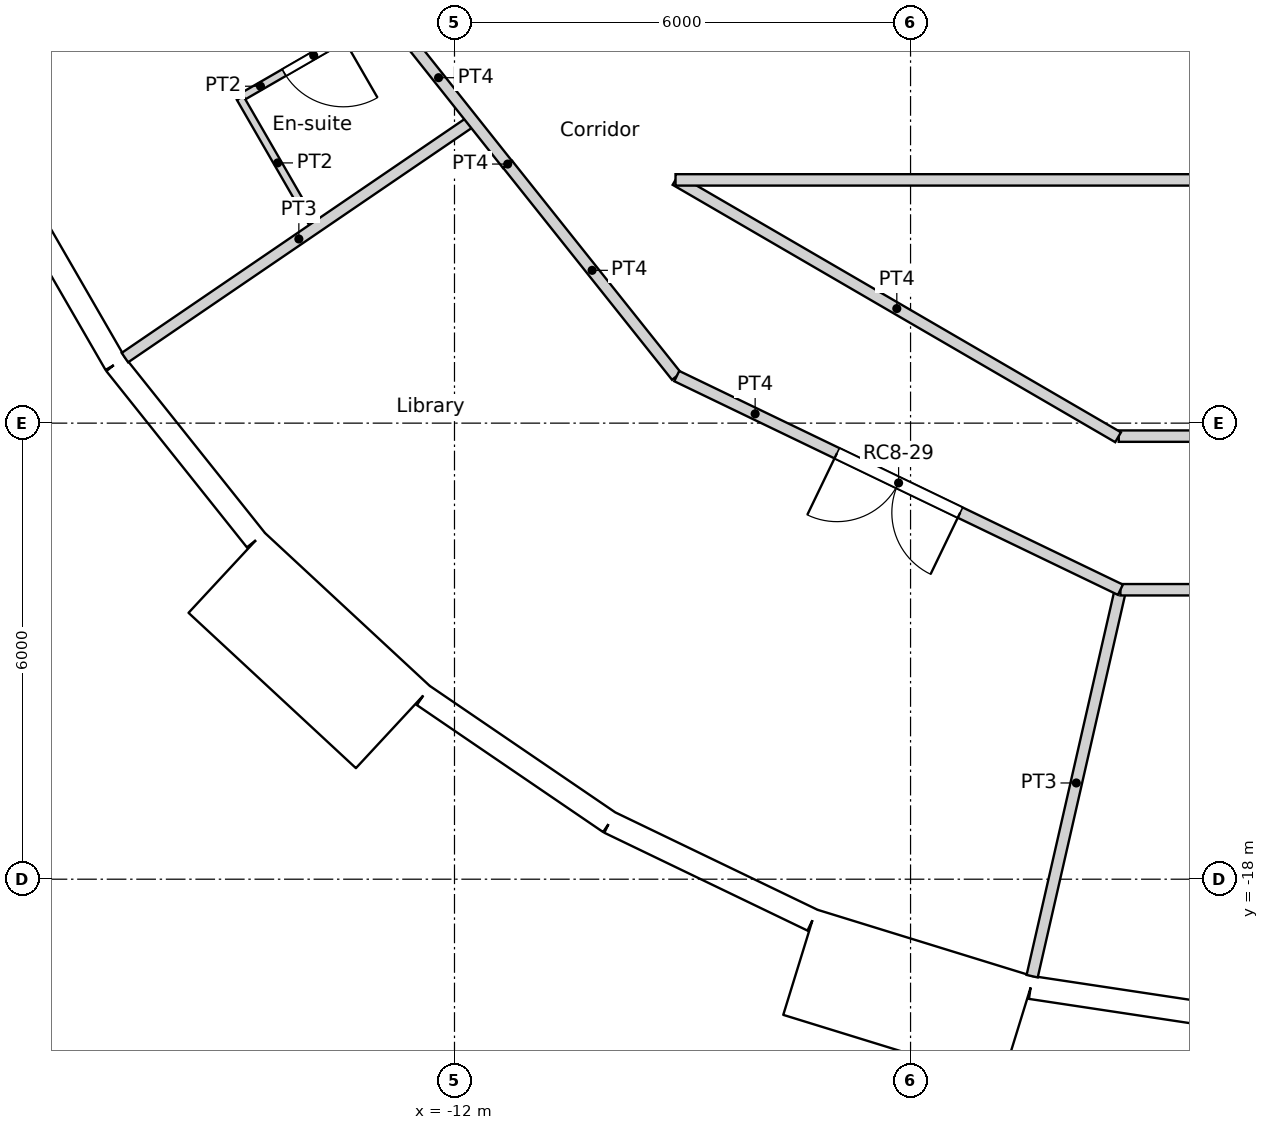
"""IFC4 building model, lengths in metres.
Left out: names, types, materials, properties, quantities, classifications, styles, units other than length and angle.
Written with IfcOpenShell. Run it as: python <this file> out.ifc"""

import sys

from ifc_helpers import new_model, si_unit, direction, frame, frame_2d, origin, origin_2d, place, context, subcontext, project, spatial, rectangle, circle, extrude, element, fill, save


model = new_model("IFC4")
c1 = context("Model", 3, precision=1e-05, world=origin(), true_north=direction((0.0, 1.0)))
c2 = subcontext(c1, "Body", "Model", "MODEL_VIEW")
j1 = project(units=[si_unit("LENGTHUNIT", "METRE"), si_unit("PLANEANGLEUNIT", "RADIAN")], contexts=[c1])
p1 = place(None, origin())
s1 = spatial("IfcSite", under=j1, at=p1, CompositionType="ELEMENT")
p2 = place(p1, origin())
s2 = spatial("IfcBuilding", under=s1, at=p2, CompositionType="ELEMENT")
p3 = place(p2, frame((0.0, 0.0, 305.4)))
s3 = spatial("IfcBuildingStorey", under=s2, at=p3, CompositionType="ELEMENT", Elevation=305.4)
for number, where, z_axis, x_axis in (
    (1, (-16.958, -8.167, 0.0), (0.0, 0.0, 1.0), (1.0, 0.0, 0.0)),
    (2, (-13.798, -12.802, 0.0), (0.0, 0.0, 1.0), (1.0, 0.0, 0.0)),
    (3, (-9.411, -16.301, 0.0), (0.0, 0.0, 1.0), (1.0, 0.0, 0.0)),
    (4, (-4.188, -18.35, 0.0), (0.0, 0.0, 1.0), (1.0, 0.0, 0.0)),
):
    element("IfcColumn", number, at=place(p3, frame(where, z_axis=z_axis, x_axis=x_axis)), inside=s3, PredefinedType="COLUMN", context=c2, shape_type="SweptSolid", body=[
        extrude(circle(Radius=0.45, at=origin_2d()), origin(), (0.0, 0.0, 1.0), 3.6),
    ])
p4 = place(p3, frame((-17.941, -8.657, 0.0), z_axis=(0.0, 0.0, 1.0), x_axis=(0.499950756475, -0.86605383268, 0.0)))
e5 = element("IfcWall", 5, at=p4, inside=s3, PredefinedType="SOLIDWALL", context=c2, shape_type="SweptSolid", body=[
    extrude(rectangle(XDim=2.962, YDim=0.3, at=frame_2d((1.481, 0.0))), origin(), (0.0, 0.0, 1.0), 2.8),
])
p5 = place(p4, frame((1.481, 0.0, 1.55)))
e6 = element("IfcOpeningElement", 6, at=p5, cuts=e5, PredefinedType="OPENING", context=c2, shape_type="SweptSolid", body=[
    extrude(circle(Radius=0.9, at=origin_2d()), frame((0.0, 0.16, 0.0), z_axis=(0.0, -1.0, 0.0), x_axis=(1.0, 0.0, 0.0)), (0.0, 0.0, 1.0), 0.32),
])
p6 = place(p3, frame((-16.46, -11.222, 0.0), z_axis=(0.0, 0.0, 1.0), x_axis=(0.623498236992, -0.781824755599, 0.0)))
e7 = element("IfcWall", 7, at=p6, inside=s3, PredefinedType="SOLIDWALL", context=c2, shape_type="SweptSolid", body=[
    extrude(rectangle(XDim=2.962, YDim=0.3, at=frame_2d((1.481, 0.0))), origin(), (0.0, 0.0, 1.0), 3.25),
])
p7 = place(p6, frame((1.481, 0.0, 1.55)))
e8 = element("IfcOpeningElement", 8, at=p7, cuts=e7, PredefinedType="OPENING", context=c2, shape_type="SweptSolid", body=[
    extrude(circle(Radius=0.9, at=origin_2d()), frame((0.0, 0.16, 0.0), z_axis=(0.0, -1.0, 0.0), x_axis=(1.0, 0.0, 0.0)), (0.0, 0.0, 1.0), 0.32),
])
p8 = place(p3, frame((-15.003, -13.964, -0.35), z_axis=(0.0, 0.0, 1.0), x_axis=(0.733022439167, -0.680204457261, 0.0)))
e9 = element("IfcWall", 9, at=p8, inside=s3, PredefinedType="ELEMENTEDWALL", context=c2, shape_type="SweptSolid", body=[
    extrude(rectangle(XDim=3.0, YDim=1.45, at=frame_2d((1.5, 0.0))), origin(), (0.0, 0.0, 1.0), 3.6),
])
p9 = place(p8, frame((1.5, 0.0, 1.9)))
e10 = element("IfcOpeningElement", 10, at=p9, cuts=e9, PredefinedType="OPENING", context=c2, shape_type="SweptSolid", body=[
    extrude(circle(Radius=0.9, at=origin_2d()), frame((0.0, 0.735, 0.0), z_axis=(0.0, -1.0, 0.0), x_axis=(1.0, 0.0, 0.0)), (0.0, 0.0, 1.0), 1.47),
])
p10 = place(p3, frame((-12.408, -15.584, 0.0), z_axis=(0.0, 0.0, 1.0), x_axis=(0.826236061068, -0.563324037646, 0.0)))
e11 = element("IfcWall", 11, at=p10, inside=s3, PredefinedType="SOLIDWALL", context=c2, shape_type="SweptSolid", body=[
    extrude(rectangle(XDim=2.962, YDim=0.3, at=frame_2d((1.481, 0.0))), origin(), (0.0, 0.0, 1.0), 2.8),
])
p11 = place(p10, frame((1.481, 0.0, 1.55)))
e12 = element("IfcOpeningElement", 12, at=p11, cuts=e11, PredefinedType="OPENING", context=c2, shape_type="SweptSolid", body=[
    extrude(circle(Radius=0.9, at=origin_2d()), frame((0.0, 0.16, 0.0), z_axis=(0.0, -1.0, 0.0), x_axis=(1.0, 0.0, 0.0)), (0.0, 0.0, 1.0), 0.32),
])
p12 = place(p3, frame((-9.961, -17.253, 0.0), z_axis=(0.0, 0.0, 1.0), x_axis=(0.90095513435, -0.433912255978, 0.0)))
e13 = element("IfcWall", 13, at=p12, inside=s3, PredefinedType="SOLIDWALL", context=c2, shape_type="SweptSolid", body=[
    extrude(rectangle(XDim=2.962, YDim=0.3, at=frame_2d((1.481, 0.0))), origin(), (0.0, 0.0, 1.0), 3.25),
])
p13 = place(p12, frame((1.481, 0.0, 1.55)))
e14 = element("IfcOpeningElement", 14, at=p13, cuts=e13, PredefinedType="OPENING", context=c2, shape_type="SweptSolid", body=[
    extrude(circle(Radius=0.9, at=origin_2d()), frame((0.0, 0.16, 0.0), z_axis=(0.0, -1.0, 0.0), x_axis=(1.0, 0.0, 0.0)), (0.0, 0.0, 1.0), 0.32),
])
p14 = place(p3, frame((-7.458, -19.091, -0.35), z_axis=(0.0, 0.0, 1.0), x_axis=(0.955571139978, -0.294760574774, 0.0)))
e15 = element("IfcWall", 15, at=p14, inside=s3, PredefinedType="ELEMENTEDWALL", context=c2, shape_type="SweptSolid", body=[
    extrude(rectangle(XDim=3.0, YDim=1.45, at=frame_2d((1.5, 0.0))), origin(), (0.0, 0.0, 1.0), 3.6),
])
p15 = place(p14, frame((1.5, 0.0, 1.9)))
e16 = element("IfcOpeningElement", 16, at=p15, cuts=e15, PredefinedType="OPENING", context=c2, shape_type="SweptSolid", body=[
    extrude(circle(Radius=0.9, at=origin_2d()), frame((0.0, 0.735, 0.0), z_axis=(0.0, -1.0, 0.0), x_axis=(1.0, 0.0, 0.0)), (0.0, 0.0, 1.0), 1.47),
])
p16 = place(p3, frame((-4.418, -19.425, 0.0), z_axis=(0.0, 0.0, 1.0), x_axis=(0.988835775663, -0.149009425104, 0.0)))
e17 = element("IfcWall", 17, at=p16, inside=s3, PredefinedType="SOLIDWALL", context=c2, shape_type="SweptSolid", body=[
    extrude(rectangle(XDim=2.962, YDim=0.3, at=frame_2d((1.481, 0.0))), origin(), (0.0, 0.0, 1.0), 2.8),
])
p17 = place(p16, frame((1.481, 0.0, 1.55)))
e18 = element("IfcOpeningElement", 18, at=p17, cuts=e17, PredefinedType="OPENING", context=c2, shape_type="SweptSolid", body=[
    extrude(circle(Radius=0.9, at=origin_2d()), frame((0.0, 0.16, 0.0), z_axis=(0.0, -1.0, 0.0), x_axis=(1.0, 0.0, 0.0)), (0.0, 0.0, 1.0), 0.32),
])
p18 = place(p3, frame((-9.092, -8.8, 0.0), z_axis=(0.0, 0.0, 1.0), x_axis=(1.0, 0.0, 0.0)))
e19 = element("IfcWall", 19, at=p18, inside=s3, PredefinedType="PARTITIONING", context=c2, shape_type="SweptSolid", body=[
    extrude(rectangle(XDim=18.193, YDim=0.15, at=frame_2d((9.096, 0.0))), origin(), (0.0, 0.0, 1.0), 3.25),
])
p19 = place(p18, frame((8.592, 0.0, 0.0)))
e20 = element("IfcOpeningElement", 20, at=p19, cuts=e19, PredefinedType="OPENING", context=c2, shape_type="SweptSolid", body=[
    extrude(rectangle(XDim=1.0, YDim=2.04, at=frame_2d((0.5, 1.02))), frame((0.0, 0.075, 0.0), z_axis=(0.0, -1.0, 0.0), x_axis=(1.0, 0.0, 0.0)), (0.0, 0.0, 1.0), 0.15),
])
p20 = place(p3, frame((-9.092, -8.8, 0.0), z_axis=(0.0, 0.0, 1.0), x_axis=(0.864470922103, -0.502682827277, 0.0)))
e21 = element("IfcWall", 21, at=p20, inside=s3, PredefinedType="PARTITIONING", context=c2, shape_type="SweptSolid", body=[
    extrude(rectangle(XDim=6.735, YDim=0.15, at=frame_2d((3.368, 0.0))), origin(), (0.0, 0.0, 1.0), 3.25),
])
p21 = place(p3, frame((-11.3, -8.596, 0.0), z_axis=(0.0, 0.0, 1.0), x_axis=(0.623165080354, -0.782090328944, 0.0)))
e22 = element("IfcWall", 22, at=p21, inside=s3, PredefinedType="PARTITIONING", context=c2, shape_type="SweptSolid", body=[
    extrude(rectangle(XDim=3.564, YDim=0.15, at=frame_2d((1.782, 0.0))), origin(), (0.0, 0.0, 1.0), 3.25),
])
p22 = place(p3, frame((-11.3, -8.596, 0.0), z_axis=(0.0, 0.0, 1.0), x_axis=(0.0, 1.0, 0.0)))
e23 = element("IfcWall", 23, at=p22, inside=s3, PredefinedType="PARTITIONING", context=c2, shape_type="SweptSolid", body=[
    extrude(rectangle(XDim=0.009, YDim=0.15, at=frame_2d((0.005, 0.0))), origin(), (0.0, 0.0, 1.0), 3.25),
])
p23 = place(p3, frame((-13.115, -6.316, 0.0), z_axis=(0.0, 0.0, 1.0), x_axis=(0.622042479172, -0.782983495423, 0.0)))
e24 = element("IfcWall", 24, at=p23, inside=s3, PredefinedType="PARTITIONING", context=c2, shape_type="SweptSolid", body=[
    extrude(rectangle(XDim=2.911, YDim=0.15, at=frame_2d((1.456, 0.0))), origin(), (0.0, 0.0, 1.0), 3.25),
])
p24 = place(p3, frame((-3.261, -12.171, 0.0), z_axis=(0.0, 0.0, 1.0), x_axis=(1.0, 0.0, 0.0)))
e25 = element("IfcWall", 25, at=p24, inside=s3, PredefinedType="PARTITIONING", context=c2, shape_type="SweptSolid", body=[
    extrude(rectangle(XDim=6.522, YDim=0.15, at=frame_2d((3.261, 0.0))), origin(), (0.0, 0.0, 1.0), 3.25),
])
p25 = place(p3, frame((-9.076, -11.381, 0.0), z_axis=(0.0, 0.0, 1.0), x_axis=(0.900976027191, -0.433868872388, 0.0)))
e26 = element("IfcWall", 26, at=p25, inside=s3, PredefinedType="PARTITIONING", context=c2, shape_type="SweptSolid", body=[
    extrude(rectangle(XDim=6.479, YDim=0.15, at=frame_2d((3.239, 0.0))), origin(), (0.0, 0.0, 1.0), 3.25),
])
p26 = place(p25, frame((2.34, 0.0, 0.0)))
e27 = element("IfcOpeningElement", 27, at=p26, cuts=e26, PredefinedType="OPENING", context=c2, shape_type="SweptSolid", body=[
    extrude(rectangle(XDim=1.8, YDim=2.1, at=frame_2d((0.9, 1.05))), frame((0.0, 0.075, 0.0), z_axis=(0.0, -1.0, 0.0), x_axis=(1.0, 0.0, 0.0)), (0.0, 0.0, 1.0), 0.15),
])
p27 = place(p3, frame((-3.239, -14.192, 0.0), z_axis=(0.0, 0.0, 1.0), x_axis=(1.0, 0.0, 0.0)))
e28 = element("IfcWall", 28, at=p27, inside=s3, PredefinedType="PARTITIONING", context=c2, shape_type="SweptSolid", body=[
    extrude(rectangle(XDim=6.478, YDim=0.15, at=frame_2d((3.239, 0.0))), origin(), (0.0, 0.0, 1.0), 3.25),
])
p28 = place(p27, frame((2.739, 0.0, 0.0)))
e29 = element("IfcOpeningElement", 29, at=p28, cuts=e28, PredefinedType="OPENING", context=c2, shape_type="SweptSolid", body=[
    extrude(rectangle(XDim=1.0, YDim=2.04, at=frame_2d((0.5, 1.02))), frame((0.0, 0.075, 0.0), z_axis=(0.0, -1.0, 0.0), x_axis=(1.0, 0.0, 0.0)), (0.0, 0.0, 1.0), 0.15),
])
p29 = place(p3, frame((-14.82, -7.722, 0.0), z_axis=(0.0, 0.0, 1.0), x_axis=(0.866076416361, 0.499911633214, 0.0)))
e30 = element("IfcWall", 30, at=p29, inside=s3, PredefinedType="PARTITIONING", context=c2, shape_type="SweptSolid", body=[
    extrude(rectangle(XDim=2.234, YDim=0.1, at=frame_2d((1.117, 0.0))), origin(), (0.0, 0.0, 1.0), 3.25),
])
p30 = place(p29, frame((0.667, 0.0, 0.0)))
e31 = element("IfcOpeningElement", 31, at=p30, cuts=e30, PredefinedType="OPENING", context=c2, shape_type="SweptSolid", body=[
    extrude(rectangle(XDim=0.9, YDim=2.04, at=frame_2d((0.45, 1.02))), frame((0.0, 0.05, 0.0), z_axis=(0.0, -1.0, 0.0), x_axis=(1.0, 0.0, 0.0)), (0.0, 0.0, 1.0), 0.1),
])
p31 = place(p3, frame((-14.82, -7.722, 0.0), z_axis=(0.0, 0.0, 1.0), x_axis=(0.500143626598, -0.865942465048, 0.0)))
e32 = element("IfcWall", 32, at=p31, inside=s3, PredefinedType="PARTITIONING", context=c2, shape_type="SweptSolid", body=[
    extrude(rectangle(XDim=1.974, YDim=0.1, at=frame_2d((0.987, 0.0))), origin(), (0.0, 0.0, 1.0), 3.25),
])
p32 = place(p3, frame((-16.336, -11.138, 0.0), z_axis=(0.0, 0.0, 1.0), x_axis=(0.82615274451, 0.563446219917, 0.0)))
e33 = element("IfcWall", 33, at=p32, inside=s3, PredefinedType="PARTITIONING", context=c2, shape_type="SweptSolid", body=[
    extrude(rectangle(XDim=5.54, YDim=0.15, at=frame_2d((2.77, 0.0))), origin(), (0.0, 0.0, 1.0), 3.25),
])
p33 = place(p3, frame((-4.4, -19.276, 0.0), z_axis=(0.0, 0.0, 1.0), x_axis=(0.222612505682, 0.974907007008, 0.0)))
e34 = element("IfcWall", 34, at=p33, inside=s3, PredefinedType="PARTITIONING", context=c2, shape_type="SweptSolid", body=[
    extrude(rectangle(XDim=5.215, YDim=0.15, at=frame_2d((2.607, 0.0))), origin(), (0.0, 0.0, 1.0), 3.25),
])
p34 = place(p5, origin())
e35 = element("IfcWindow", 35, at=p34, inside=s3, PartitioningType="SINGLE_PANEL", PredefinedType="WINDOW", context=c2, shape_type="SweptSolid", body=[
    extrude(circle(Radius=0.9, at=origin_2d()), frame((0.0, 0.12, 0.0), z_axis=(0.0, -1.0, 0.0), x_axis=(1.0, 0.0, 0.0)), (0.0, 0.0, 1.0), 0.1),
])
fill(e6, e35)
p35 = place(p7, origin())
e36 = element("IfcWindow", 36, at=p35, inside=s3, PartitioningType="SINGLE_PANEL", PredefinedType="WINDOW", context=c2, shape_type="SweptSolid", body=[
    extrude(circle(Radius=0.9, at=origin_2d()), frame((0.0, 0.12, 0.0), z_axis=(0.0, -1.0, 0.0), x_axis=(1.0, 0.0, 0.0)), (0.0, 0.0, 1.0), 0.1),
])
fill(e8, e36)
p36 = place(p9, origin())
e37 = element("IfcWindow", 37, at=p36, inside=s3, PartitioningType="SINGLE_PANEL", PredefinedType="WINDOW", context=c2, shape_type="SweptSolid", body=[
    extrude(circle(Radius=0.9, at=origin_2d()), frame((0.0, 0.695, 0.0), z_axis=(0.0, -1.0, 0.0), x_axis=(1.0, 0.0, 0.0)), (0.0, 0.0, 1.0), 0.1),
])
fill(e10, e37)
p37 = place(p11, origin())
e38 = element("IfcWindow", 38, at=p37, inside=s3, PartitioningType="SINGLE_PANEL", PredefinedType="WINDOW", context=c2, shape_type="SweptSolid", body=[
    extrude(circle(Radius=0.9, at=origin_2d()), frame((0.0, 0.12, 0.0), z_axis=(0.0, -1.0, 0.0), x_axis=(1.0, 0.0, 0.0)), (0.0, 0.0, 1.0), 0.1),
])
fill(e12, e38)
p38 = place(p13, origin())
e39 = element("IfcWindow", 39, at=p38, inside=s3, PartitioningType="SINGLE_PANEL", PredefinedType="WINDOW", context=c2, shape_type="SweptSolid", body=[
    extrude(circle(Radius=0.9, at=origin_2d()), frame((0.0, 0.12, 0.0), z_axis=(0.0, -1.0, 0.0), x_axis=(1.0, 0.0, 0.0)), (0.0, 0.0, 1.0), 0.1),
])
fill(e14, e39)
p39 = place(p15, origin())
e40 = element("IfcWindow", 40, at=p39, inside=s3, PartitioningType="SINGLE_PANEL", PredefinedType="WINDOW", context=c2, shape_type="SweptSolid", body=[
    extrude(circle(Radius=0.9, at=origin_2d()), frame((0.0, 0.695, 0.0), z_axis=(0.0, -1.0, 0.0), x_axis=(1.0, 0.0, 0.0)), (0.0, 0.0, 1.0), 0.1),
])
fill(e16, e40)
p40 = place(p17, origin())
e41 = element("IfcWindow", 41, at=p40, inside=s3, PartitioningType="SINGLE_PANEL", PredefinedType="WINDOW", context=c2, shape_type="SweptSolid", body=[
    extrude(circle(Radius=0.9, at=origin_2d()), frame((0.0, 0.12, 0.0), z_axis=(0.0, -1.0, 0.0), x_axis=(1.0, 0.0, 0.0)), (0.0, 0.0, 1.0), 0.1),
])
fill(e18, e41)
p41 = place(p30, origin())
e42 = element("IfcDoor", 42, at=p41, inside=s3, OperationType="SINGLE_SWING_LEFT", PredefinedType="DOOR", context=c2, shape_type="SweptSolid", body=[
    extrude(rectangle(XDim=0.9, YDim=2.04, at=frame_2d((0.45, 1.02))), frame((0.0, 0.025, 0.0), z_axis=(0.0, -1.0, 0.0), x_axis=(1.0, 0.0, 0.0)), (0.0, 0.0, 1.0), 0.05),
])
fill(e31, e42)
p42 = place(p26, origin())
e43 = element("IfcDoor", 43, at=p42, inside=s3, OperationType="DOUBLE_DOOR_SINGLE_SWING", PredefinedType="DOOR", context=c2, shape_type="SweptSolid", body=[
    extrude(rectangle(XDim=1.8, YDim=2.1, at=frame_2d((0.9, 1.05))), frame((0.0, 0.025, 0.0), z_axis=(0.0, -1.0, 0.0), x_axis=(1.0, 0.0, 0.0)), (0.0, 0.0, 1.0), 0.05),
])
fill(e27, e43)
save(model, sys.argv[1])
